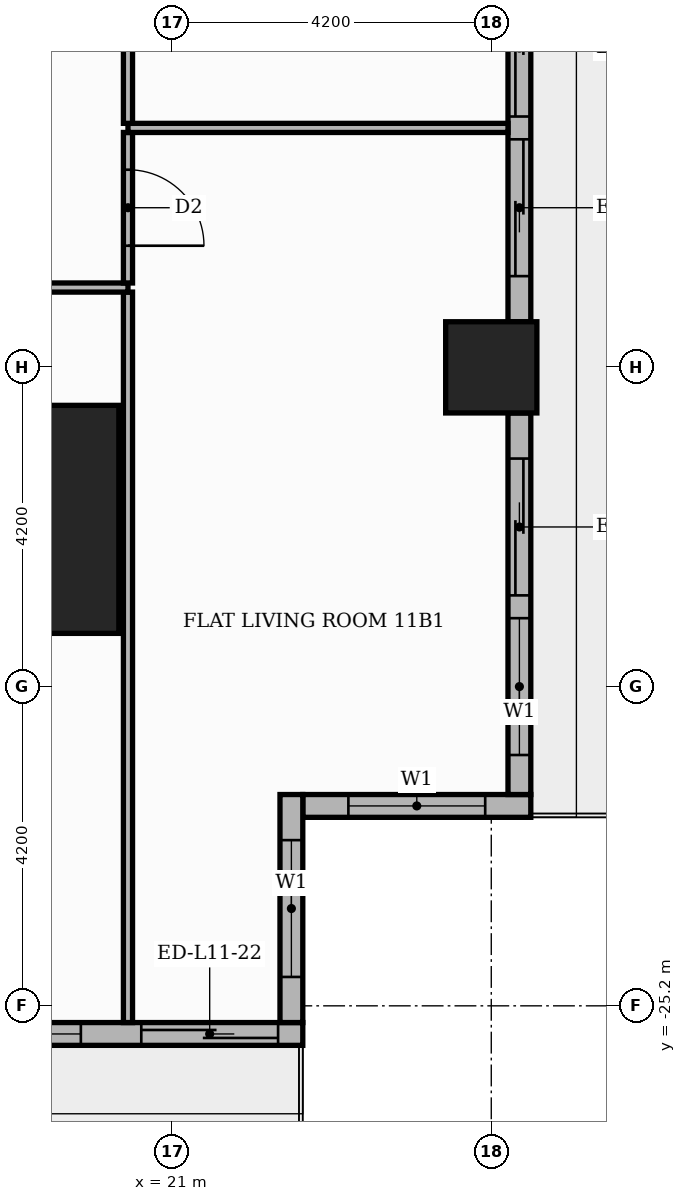
"""IFC4 building model, lengths in metres.
Left out: names, types, materials, properties, quantities, classifications, styles, units other than length and angle.
Written with IfcOpenShell. Run it as: python <this file> out.ifc"""

import sys

from ifc_helpers import new_model, si_unit, direction, frame, frame_2d, origin, origin_2d, place, context, subcontext, project, spatial, rectangle, extrude, element, fill, save


model = new_model("IFC4")
c1 = context("Model", 3, precision=1e-05, world=origin(), true_north=direction((0.0, 1.0)))
c2 = subcontext(c1, "Body", "Model", "MODEL_VIEW")
j1 = project(units=[si_unit("LENGTHUNIT", "METRE"), si_unit("PLANEANGLEUNIT", "RADIAN")], contexts=[c1])
p1 = place(None, origin())
s1 = spatial("IfcSite", under=j1, at=p1, CompositionType="ELEMENT")
p2 = place(p1, origin())
s2 = spatial("IfcBuilding", under=s1, at=p2, CompositionType="ELEMENT")
p3 = place(p2, frame((0.0, 0.0, 50.4)))
s3 = spatial("IfcBuildingStorey", under=s2, at=p3, CompositionType="ELEMENT", Elevation=50.4)
p4 = place(p3, frame((18.8, -18.8, 0.0), z_axis=(0.0, 0.0, 1.0), x_axis=(1.0, 0.0, 0.0)))
e1 = element("IfcColumn", 1, at=p4, inside=s3, PredefinedType="COLUMN", context=c2, shape_type="SweptSolid", body=[
    extrude(rectangle(XDim=3.0, YDim=3.0, at=origin_2d()), origin(), (0.0, 0.0, 1.0), 3.9),
])
p5 = place(p3, frame((25.2, -16.8, 0.0), z_axis=(0.0, 0.0, 1.0), x_axis=(1.0, 0.0, 0.0)))
e2 = element("IfcColumn", 2, at=p5, inside=s3, PredefinedType="COLUMN", context=c2, shape_type="SweptSolid", body=[
    extrude(rectangle(XDim=1.2, YDim=1.2, at=origin_2d()), origin(), (0.0, 0.0, 1.0), 3.9),
])
p6 = place(p3, frame((22.72, -22.57, 0.0), z_axis=(0.0, 0.0, 1.0), x_axis=(1.0, 0.0, 0.0)))
e3 = element("IfcWall", 3, at=p6, inside=s3, PredefinedType="STANDARD", context=c2, shape_type="SweptSolid", body=[
    extrude(rectangle(XDim=3.0, YDim=0.3, at=frame_2d((1.5, 0.0))), origin(), (0.0, 0.0, 1.0), 3.48),
])
p7 = place(p6, frame((0.6, 0.0, 0.9)))
e4 = element("IfcOpeningElement", 4, at=p7, cuts=e3, PredefinedType="OPENING", context=c2, shape_type="SweptSolid", body=[
    extrude(rectangle(XDim=1.8, YDim=2.1, at=frame_2d((0.9, 1.05))), frame((0.0, 0.16, 0.0), z_axis=(0.0, -1.0, 0.0), x_axis=(1.0, 0.0, 0.0)), (0.0, 0.0, 1.0), 0.32),
])
p8 = place(p3, frame((25.57, -22.42, 0.0), z_axis=(0.0, 0.0, 1.0), x_axis=(0.0, 1.0, 0.0)))
e5 = element("IfcWall", 5, at=p8, inside=s3, PredefinedType="STANDARD", context=c2, shape_type="SweptSolid", body=[
    extrude(rectangle(XDim=5.02, YDim=0.3, at=frame_2d((2.51, 0.0))), origin(), (0.0, 0.0, 1.0), 3.48),
])
p9 = place(p8, frame((0.52, 0.0, 0.9)))
e6 = element("IfcOpeningElement", 6, at=p9, cuts=e5, PredefinedType="OPENING", context=c2, shape_type="SweptSolid", body=[
    extrude(rectangle(XDim=1.8, YDim=2.1, at=frame_2d((0.9, 1.05))), frame((0.0, 0.16, 0.0), z_axis=(0.0, -1.0, 0.0), x_axis=(1.0, 0.0, 0.0)), (0.0, 0.0, 1.0), 0.32),
])
p10 = place(p8, frame((2.62, 0.0, 0.0)))
e7 = element("IfcOpeningElement", 7, at=p10, cuts=e5, PredefinedType="OPENING", context=c2, shape_type="SweptSolid", body=[
    extrude(rectangle(XDim=1.8, YDim=2.4, at=frame_2d((0.9, 1.2))), frame((0.0, 0.16, 0.0), z_axis=(0.0, -1.0, 0.0), x_axis=(1.0, 0.0, 0.0)), (0.0, 0.0, 1.0), 0.32),
])
p11 = place(p3, frame((25.57, -16.2, 0.0), z_axis=(0.0, 0.0, 1.0), x_axis=(0.0, 1.0, 0.0)))
e8 = element("IfcWall", 8, at=p11, inside=s3, PredefinedType="STANDARD", context=c2, shape_type="SweptSolid", body=[
    extrude(rectangle(XDim=7.2, YDim=0.3, at=frame_2d((3.6, 0.0))), origin(), (0.0, 0.0, 1.0), 3.48),
])
p12 = place(p11, frame((0.6, 0.0, 0.0)))
e9 = element("IfcOpeningElement", 9, at=p12, cuts=e8, PredefinedType="OPENING", context=c2, shape_type="SweptSolid", body=[
    extrude(rectangle(XDim=1.8, YDim=2.4, at=frame_2d((0.9, 1.2))), frame((0.0, 0.16, 0.0), z_axis=(0.0, -1.0, 0.0), x_axis=(1.0, 0.0, 0.0)), (0.0, 0.0, 1.0), 0.32),
])
p13 = place(p11, frame((2.7, 0.0, 0.0)))
e10 = element("IfcOpeningElement", 10, at=p13, cuts=e8, PredefinedType="OPENING", context=c2, shape_type="SweptSolid", body=[
    extrude(rectangle(XDim=1.8, YDim=2.4, at=frame_2d((0.9, 1.2))), frame((0.0, 0.16, 0.0), z_axis=(0.0, -1.0, 0.0), x_axis=(1.0, 0.0, 0.0)), (0.0, 0.0, 1.0), 0.32),
])
p14 = place(p11, frame((4.8, 0.0, 0.9)))
e11 = element("IfcOpeningElement", 11, at=p14, cuts=e8, PredefinedType="OPENING", context=c2, shape_type="SweptSolid", body=[
    extrude(rectangle(XDim=1.8, YDim=2.1, at=frame_2d((0.9, 1.05))), frame((0.0, 0.16, 0.0), z_axis=(0.0, -1.0, 0.0), x_axis=(1.0, 0.0, 0.0)), (0.0, 0.0, 1.0), 0.32),
])
p15 = place(p3, frame((17.4, -25.57, 0.0), z_axis=(0.0, 0.0, 1.0), x_axis=(1.0, 0.0, 0.0)))
e12 = element("IfcWall", 12, at=p15, inside=s3, PredefinedType="STANDARD", context=c2, shape_type="SweptSolid", body=[
    extrude(rectangle(XDim=5.32, YDim=0.3, at=frame_2d((2.66, 0.0))), origin(), (0.0, 0.0, 1.0), 3.48),
])
p16 = place(p15, frame((0.6, 0.0, 0.9)))
e13 = element("IfcOpeningElement", 13, at=p16, cuts=e12, PredefinedType="OPENING", context=c2, shape_type="SweptSolid", body=[
    extrude(rectangle(XDim=1.8, YDim=2.1, at=frame_2d((0.9, 1.05))), frame((0.0, 0.16, 0.0), z_axis=(0.0, -1.0, 0.0), x_axis=(1.0, 0.0, 0.0)), (0.0, 0.0, 1.0), 0.32),
])
p17 = place(p15, frame((3.195, 0.0, 0.0)))
e14 = element("IfcOpeningElement", 14, at=p17, cuts=e12, PredefinedType="OPENING", context=c2, shape_type="SweptSolid", body=[
    extrude(rectangle(XDim=1.8, YDim=2.4, at=frame_2d((0.9, 1.2))), frame((0.0, 0.16, 0.0), z_axis=(0.0, -1.0, 0.0), x_axis=(1.0, 0.0, 0.0)), (0.0, 0.0, 1.0), 0.32),
])
p18 = place(p3, frame((22.57, -25.42, 0.0), z_axis=(0.0, 0.0, 1.0), x_axis=(0.0, 1.0, 0.0)))
e15 = element("IfcWall", 15, at=p18, inside=s3, PredefinedType="STANDARD", context=c2, shape_type="SweptSolid", body=[
    extrude(rectangle(XDim=3.0, YDim=0.3, at=frame_2d((1.5, 0.0))), origin(), (0.0, 0.0, 1.0), 3.48),
])
p19 = place(p18, frame((0.6, 0.0, 0.9)))
e16 = element("IfcOpeningElement", 16, at=p19, cuts=e15, PredefinedType="OPENING", context=c2, shape_type="SweptSolid", body=[
    extrude(rectangle(XDim=1.8, YDim=2.1, at=frame_2d((0.9, 1.05))), frame((0.0, 0.16, 0.0), z_axis=(0.0, -1.0, 0.0), x_axis=(1.0, 0.0, 0.0)), (0.0, 0.0, 1.0), 0.32),
])
p20 = place(p3, frame((20.42, -25.42, 0.0), z_axis=(0.0, 0.0, 1.0), x_axis=(0.0, 1.0, 0.0)))
e17 = element("IfcWall", 17, at=p20, inside=s3, PredefinedType="PARTITIONING", context=c2, shape_type="SweptSolid", body=[
    extrude(rectangle(XDim=9.61, YDim=0.12, at=frame_2d((4.805, 0.0))), origin(), (0.0, 0.0, 1.0), 3.48),
])
p21 = place(p3, frame((13.75, -15.75, 0.0), z_axis=(0.0, 0.0, 1.0), x_axis=(1.0, 0.0, 0.0)))
e18 = element("IfcWall", 18, at=p21, inside=s3, PredefinedType="PARTITIONING", context=c2, shape_type="SweptSolid", body=[
    extrude(rectangle(XDim=6.67, YDim=0.12, at=frame_2d((3.335, 0.0))), origin(), (0.0, 0.0, 1.0), 3.48),
])
p22 = place(p21, frame((2.785, 0.0, 0.0)))
e19 = element("IfcOpeningElement", 19, at=p22, cuts=e18, PredefinedType="OPENING", context=c2, shape_type="SweptSolid", body=[
    extrude(rectangle(XDim=1.0, YDim=2.1, at=frame_2d((0.5, 1.05))), frame((0.0, 0.07, 0.0), z_axis=(0.0, -1.0, 0.0), x_axis=(1.0, 0.0, 0.0)), (0.0, 0.0, 1.0), 0.14),
])
p23 = place(p3, frame((20.42, -15.69, 0.0), z_axis=(0.0, 0.0, 1.0), x_axis=(0.0, 1.0, 0.0)))
e20 = element("IfcWall", 20, at=p23, inside=s3, PredefinedType="PARTITIONING", context=c2, shape_type="SweptSolid", body=[
    extrude(rectangle(XDim=1.98, YDim=0.12, at=frame_2d((0.99, 0.0))), origin(), (0.0, 0.0, 1.0), 3.48),
])
p24 = place(p23, frame((0.49, 0.0, 0.0)))
e21 = element("IfcOpeningElement", 21, at=p24, cuts=e20, PredefinedType="OPENING", context=c2, shape_type="SweptSolid", body=[
    extrude(rectangle(XDim=1.0, YDim=2.1, at=frame_2d((0.5, 1.05))), frame((0.0, 0.07, 0.0), z_axis=(0.0, -1.0, 0.0), x_axis=(1.0, 0.0, 0.0)), (0.0, 0.0, 1.0), 0.14),
])
p25 = place(p3, frame((20.42, -13.65, 0.0), z_axis=(0.0, 0.0, 1.0), x_axis=(1.0, 0.0, 0.0)))
e22 = element("IfcWall", 22, at=p25, inside=s3, PredefinedType="PARTITIONING", context=c2, shape_type="SweptSolid", body=[
    extrude(rectangle(XDim=5.0, YDim=0.12, at=frame_2d((2.5, 0.0))), origin(), (0.0, 0.0, 1.0), 3.48),
])
p26 = place(p3, frame((20.42, -13.59, 0.0), z_axis=(0.0, 0.0, 1.0), x_axis=(0.0, 1.0, 0.0)))
e23 = element("IfcWall", 23, at=p26, inside=s3, PredefinedType="PARTITIONING", context=c2, shape_type="SweptSolid", body=[
    extrude(rectangle(XDim=4.08, YDim=0.12, at=frame_2d((2.04, 0.0))), origin(), (0.0, 0.0, 1.0), 3.48),
])
p27 = place(p26, frame((1.59, 0.0, 0.0)))
e24 = element("IfcOpeningElement", 24, at=p27, cuts=e23, PredefinedType="OPENING", context=c2, shape_type="SweptSolid", body=[
    extrude(rectangle(XDim=0.9, YDim=2.1, at=frame_2d((0.45, 1.05))), frame((0.0, 0.07, 0.0), z_axis=(0.0, -1.0, 0.0), x_axis=(1.0, 0.0, 0.0)), (0.0, 0.0, 1.0), 0.14),
])
p28 = place(p7, origin())
e25 = element("IfcWindow", 25, at=p28, inside=s3, PartitioningType="SINGLE_PANEL", PredefinedType="WINDOW", context=c2, shape_type="SweptSolid", body=[
    extrude(rectangle(XDim=1.8, YDim=2.1, at=frame_2d((0.9, 1.05))), frame((0.0, 0.03, 0.0), z_axis=(0.0, -1.0, 0.0), x_axis=(1.0, 0.0, 0.0)), (0.0, 0.0, 1.0), 0.06),
])
fill(e4, e25)
p29 = place(p9, origin())
e26 = element("IfcWindow", 26, at=p29, inside=s3, PartitioningType="SINGLE_PANEL", PredefinedType="WINDOW", context=c2, shape_type="SweptSolid", body=[
    extrude(rectangle(XDim=1.8, YDim=2.1, at=frame_2d((0.9, 1.05))), frame((0.0, 0.03, 0.0), z_axis=(0.0, -1.0, 0.0), x_axis=(1.0, 0.0, 0.0)), (0.0, 0.0, 1.0), 0.06),
])
fill(e6, e26)
p30 = place(p10, origin())
e27 = element("IfcDoor", 27, at=p30, inside=s3, OperationType="SLIDING_TO_RIGHT", PredefinedType="DOOR", context=c2, shape_type="SweptSolid", body=[
    extrude(rectangle(XDim=1.8, YDim=2.4, at=frame_2d((0.9, 1.2))), frame((0.0, 0.025, 0.0), z_axis=(0.0, -1.0, 0.0), x_axis=(1.0, 0.0, 0.0)), (0.0, 0.0, 1.0), 0.05),
])
fill(e7, e27)
p31 = place(p12, origin())
e28 = element("IfcDoor", 28, at=p31, inside=s3, OperationType="SLIDING_TO_LEFT", PredefinedType="DOOR", context=c2, shape_type="SweptSolid", body=[
    extrude(rectangle(XDim=1.8, YDim=2.4, at=frame_2d((0.9, 1.2))), frame((0.0, 0.025, 0.0), z_axis=(0.0, -1.0, 0.0), x_axis=(1.0, 0.0, 0.0)), (0.0, 0.0, 1.0), 0.05),
])
fill(e9, e28)
p32 = place(p13, origin())
e29 = element("IfcDoor", 29, at=p32, inside=s3, OperationType="SLIDING_TO_RIGHT", PredefinedType="DOOR", context=c2, shape_type="SweptSolid", body=[
    extrude(rectangle(XDim=1.8, YDim=2.4, at=frame_2d((0.9, 1.2))), frame((0.0, 0.025, 0.0), z_axis=(0.0, -1.0, 0.0), x_axis=(1.0, 0.0, 0.0)), (0.0, 0.0, 1.0), 0.05),
])
fill(e10, e29)
p33 = place(p16, origin())
e30 = element("IfcWindow", 30, at=p33, inside=s3, PartitioningType="SINGLE_PANEL", PredefinedType="WINDOW", context=c2, shape_type="SweptSolid", body=[
    extrude(rectangle(XDim=1.8, YDim=2.1, at=frame_2d((0.9, 1.05))), frame((0.0, 0.03, 0.0), z_axis=(0.0, -1.0, 0.0), x_axis=(1.0, 0.0, 0.0)), (0.0, 0.0, 1.0), 0.06),
])
fill(e13, e30)
p34 = place(p17, origin())
e31 = element("IfcDoor", 31, at=p34, inside=s3, OperationType="SLIDING_TO_RIGHT", PredefinedType="DOOR", context=c2, shape_type="SweptSolid", body=[
    extrude(rectangle(XDim=1.8, YDim=2.4, at=frame_2d((0.9, 1.2))), frame((0.0, 0.025, 0.0), z_axis=(0.0, -1.0, 0.0), x_axis=(1.0, 0.0, 0.0)), (0.0, 0.0, 1.0), 0.05),
])
fill(e14, e31)
p35 = place(p19, origin())
e32 = element("IfcWindow", 32, at=p35, inside=s3, PartitioningType="SINGLE_PANEL", PredefinedType="WINDOW", context=c2, shape_type="SweptSolid", body=[
    extrude(rectangle(XDim=1.8, YDim=2.1, at=frame_2d((0.9, 1.05))), frame((0.0, 0.03, 0.0), z_axis=(0.0, -1.0, 0.0), x_axis=(1.0, 0.0, 0.0)), (0.0, 0.0, 1.0), 0.06),
])
fill(e16, e32)
p36 = place(p24, frame((1.0, 0.0, 0.0), z_axis=(0.0, 0.0, 1.0), x_axis=(-1.0, 0.0, 0.0)))
e33 = element("IfcDoor", 33, at=p36, inside=s3, OperationType="SINGLE_SWING_LEFT", PredefinedType="DOOR", context=c2, shape_type="SweptSolid", body=[
    extrude(rectangle(XDim=1.0, YDim=2.1, at=frame_2d((0.5, 1.05))), frame((0.0, 0.025, 0.0), z_axis=(0.0, -1.0, 0.0), x_axis=(1.0, 0.0, 0.0)), (0.0, 0.0, 1.0), 0.05),
])
fill(e21, e33)
save(model, sys.argv[1])
